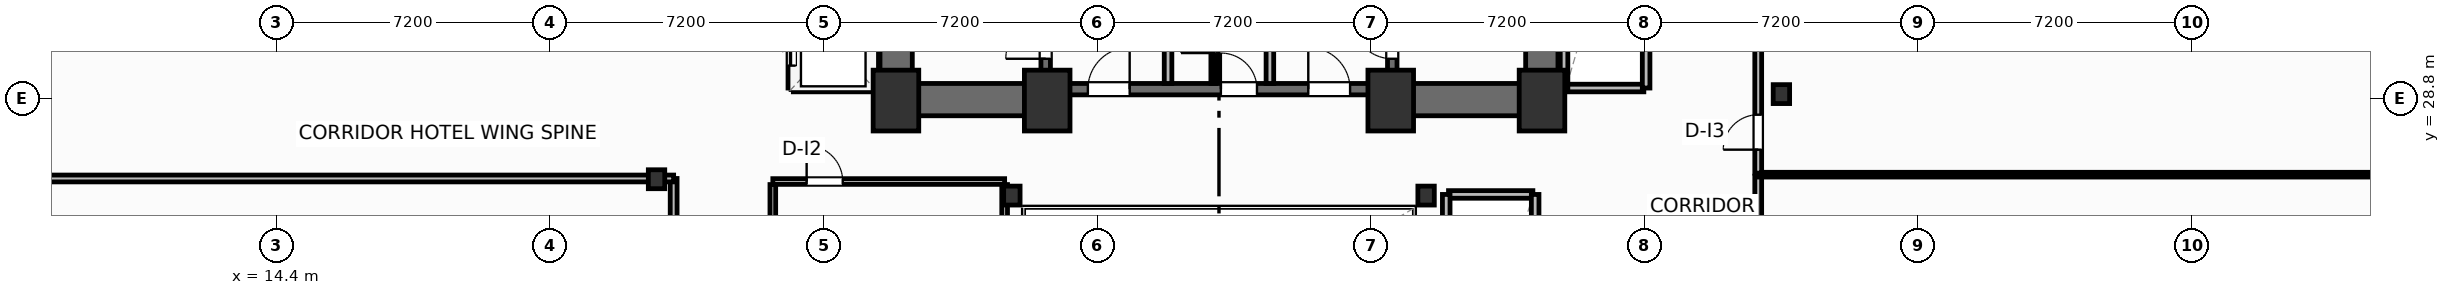
"""IFC4 building model, lengths in metres.
Left out: names, types, materials, properties, quantities, classifications, styles, units other than length and angle.
Written with IfcOpenShell. Run it as: python <this file> out.ifc"""

import sys

from ifc_helpers import new_model, si_unit, direction, frame, frame_2d, origin, origin_2d, place, context, subcontext, project, spatial, rectangle, i_section, extrude, element, fill, save


model = new_model("IFC4")
c1 = context("Model", 3, precision=1e-05, world=origin(), true_north=direction((0.0, 1.0)))
c2 = subcontext(c1, "Body", "Model", "MODEL_VIEW")
j1 = project(units=[si_unit("LENGTHUNIT", "METRE"), si_unit("PLANEANGLEUNIT", "RADIAN")], contexts=[c1])
p1 = place(None, origin())
s1 = spatial("IfcSite", under=j1, at=p1, CompositionType="ELEMENT")
p2 = place(p1, origin())
s2 = spatial("IfcBuilding", under=s1, at=p2, CompositionType="ELEMENT")
p3 = place(p2, frame((0.0, 0.0, 60.3)))
s3 = spatial("IfcBuildingStorey", under=s2, at=p3, CompositionType="ELEMENT", Elevation=60.3)
for number, where, z_axis, x_axis in (
    (1, (30.7, 28.75, 0.0), (0.0, 0.0, 1.0), (1.0, 0.0, 0.0)),
    (2, (34.68, 28.75, 0.0), (0.0, 0.0, 1.0), (1.0, 0.0, 0.0)),
    (3, (43.72, 28.75, 0.0), (0.0, 0.0, 1.0), (1.0, 0.0, 0.0)),
    (4, (47.7, 28.75, 0.0), (0.0, 0.0, 1.0), (1.0, 0.0, 0.0)),
):
    element("IfcColumn", number, at=place(p3, frame(where, z_axis=z_axis, x_axis=x_axis)), inside=s3, PredefinedType="COLUMN", context=c2, shape_type="SweptSolid", body=[
        extrude(rectangle(XDim=1.2, YDim=1.6, at=origin_2d()), origin(), (0.0, 0.0, 1.0), 3.7),
    ])
for number, where, z_axis, x_axis in (
    (5, (33.75, 26.25, 0.0), (0.0, 0.0, 1.0), (1.0, 0.0, 0.0)),
    (6, (44.65, 26.25, 0.0), (0.0, 0.0, 1.0), (1.0, 0.0, 0.0)),
    (7, (24.4, 26.68, 0.0), (0.0, 0.0, 1.0), (1.0, 0.0, 0.0)),
    (8, (54.0, 28.92, 0.0), (0.0, 0.0, 1.0), (1.0, 0.0, 0.0)),
):
    element("IfcColumn", number, at=place(p3, frame(where, z_axis=z_axis, x_axis=x_axis)), inside=s3, PredefinedType="COLUMN", context=c2, shape_type="SweptSolid", body=[
        extrude(i_section(OverallWidth=0.432, OverallDepth=0.498, WebThickness=0.056, FlangeThickness=0.089, FilletRadius=0.025, at=origin_2d()), origin(), (0.0, 0.0, 1.0), 3.7),
    ])
for number, where, z_axis, x_axis in (
    (9, (30.705, 29.2, 0.0), (0.0, 0.0, 1.0), (0.0, 1.0, 0.0)),
    (10, (47.695, 29.2, 0.0), (0.0, 0.0, 1.0), (0.0, 1.0, 0.0)),
):
    element("IfcWall", number, at=place(p3, frame(where, z_axis=z_axis, x_axis=x_axis)), inside=s3, PredefinedType="SHEAR", context=c2, shape_type="SweptSolid", body=[
        extrude(rectangle(XDim=9.22, YDim=0.85, at=frame_2d((4.61, 0.0))), origin(), (0.0, 0.0, 1.0), 3.45),
    ])
for number, where, z_axis, x_axis in (
    (11, (30.28, 28.775, 0.0), (0.0, 0.0, 1.0), (1.0, 0.0, 0.0)),
    (12, (43.6, 28.775, 0.0), (0.0, 0.0, 1.0), (1.0, 0.0, 0.0)),
):
    element("IfcWall", number, at=place(p3, frame(where, z_axis=z_axis, x_axis=x_axis)), inside=s3, PredefinedType="SHEAR", context=c2, shape_type="SweptSolid", body=[
        extrude(rectangle(XDim=4.52, YDim=0.85, at=frame_2d((2.26, 0.0))), origin(), (0.0, 0.0, 1.0), 3.45),
    ])
p4 = place(p3, frame((34.8, 29.05, 0.0), z_axis=(0.0, 0.0, 1.0), x_axis=(1.0, 0.0, 0.0)))
e13 = element("IfcWall", 13, at=p4, inside=s3, PredefinedType="SHEAR", context=c2, shape_type="SweptSolid", body=[
    extrude(rectangle(XDim=8.8, YDim=0.3, at=frame_2d((4.4, 0.0))), origin(), (0.0, 0.0, 1.0), 3.45),
])
p5 = place(p4, frame((0.95, 0.0, 0.0)))
e14 = element("IfcOpeningElement", 14, at=p5, cuts=e13, PredefinedType="OPENING", context=c2, shape_type="SweptSolid", body=[
    extrude(rectangle(XDim=1.1, YDim=2.15, at=frame_2d((0.55, 1.075))), frame((0.0, 0.16, 0.0), z_axis=(0.0, -1.0, 0.0), x_axis=(1.0, 0.0, 0.0)), (0.0, 0.0, 1.0), 0.32),
])
p6 = place(p4, frame((6.75, 0.0, 0.0)))
e15 = element("IfcOpeningElement", 15, at=p6, cuts=e13, PredefinedType="OPENING", context=c2, shape_type="SweptSolid", body=[
    extrude(rectangle(XDim=1.1, YDim=2.15, at=frame_2d((0.55, 1.075))), frame((0.0, 0.16, 0.0), z_axis=(0.0, -1.0, 0.0), x_axis=(1.0, 0.0, 0.0)), (0.0, 0.0, 1.0), 0.32),
])
p7 = place(p4, frame((4.45, 0.0, 0.0)))
e16 = element("IfcOpeningElement", 16, at=p7, cuts=e13, PredefinedType="OPENING", context=c2, shape_type="SweptSolid", body=[
    extrude(rectangle(XDim=0.95, YDim=2.15, at=frame_2d((0.475, 1.075))), frame((0.0, 0.16, 0.0), z_axis=(0.0, -1.0, 0.0), x_axis=(1.0, 0.0, 0.0)), (0.0, 0.0, 1.0), 0.32),
])
p8 = place(p3, frame((34.64, 29.2, 0.0), z_axis=(0.0, 0.0, 1.0), x_axis=(0.0, 1.0, 0.0)))
e17 = element("IfcWall", 17, at=p8, inside=s3, PredefinedType="SHEAR", context=c2, shape_type="SweptSolid", body=[
    extrude(rectangle(XDim=9.22, YDim=0.25, at=frame_2d((4.61, 0.0))), origin(), (0.0, 0.0, 1.0), 3.45),
])
p9 = place(p8, frame((0.65, 0.0, 0.0)))
e18 = element("IfcOpeningElement", 18, at=p9, cuts=e17, PredefinedType="OPENING", context=c2, shape_type="SweptSolid", body=[
    extrude(rectangle(XDim=1.05, YDim=2.15, at=frame_2d((0.525, 1.075))), frame((0.0, 0.135, 0.0), z_axis=(0.0, -1.0, 0.0), x_axis=(1.0, 0.0, 0.0)), (0.0, 0.0, 1.0), 0.27),
])
p10 = place(p3, frame((43.76, 29.2, 0.0), z_axis=(0.0, 0.0, 1.0), x_axis=(0.0, 1.0, 0.0)))
e19 = element("IfcWall", 19, at=p10, inside=s3, PredefinedType="SHEAR", context=c2, shape_type="SweptSolid", body=[
    extrude(rectangle(XDim=9.22, YDim=0.25, at=frame_2d((4.61, 0.0))), origin(), (0.0, 0.0, 1.0), 3.45),
])
p11 = place(p10, frame((0.65, 0.0, 0.0)))
e20 = element("IfcOpeningElement", 20, at=p11, cuts=e19, PredefinedType="OPENING", context=c2, shape_type="SweptSolid", body=[
    extrude(rectangle(XDim=1.05, YDim=2.15, at=frame_2d((0.525, 1.075))), frame((0.0, 0.135, 0.0), z_axis=(0.0, -1.0, 0.0), x_axis=(1.0, 0.0, 0.0)), (0.0, 0.0, 1.0), 0.27),
])
p12 = place(p3, frame((81.127, 26.995, 0.0), z_axis=(0.0, 0.0, 1.0), x_axis=(-0.823530169317, 0.567272474411, 0.0)))
e21 = element("IfcWall", 21, at=p12, inside=s3, PredefinedType="SOLIDWALL", context=c2, shape_type="SweptSolid", body=[
    extrude(rectangle(XDim=23.247, YDim=0.22, at=frame_2d((11.624, 0.0))), origin(), (0.0, 0.0, 1.0), 2.73),
])
p13 = place(p12, frame((10.799, 0.0, 0.8)))
e22 = element("IfcOpeningElement", 22, at=p13, cuts=e21, PredefinedType="OPENING", context=c2, shape_type="SweptSolid", body=[
    extrude(rectangle(XDim=1.65, YDim=1.65, at=frame_2d((0.825, 0.825))), frame((0.0, 0.12, 0.0), z_axis=(0.0, -1.0, 0.0), x_axis=(1.0, 0.0, 0.0)), (0.0, 0.0, 1.0), 0.24),
])
p14 = place(p3, frame((24.85, 19.24, 0.0), z_axis=(0.0, 0.0, 1.0), x_axis=(0.0, 1.0, 0.0)))
e23 = element("IfcWall", 23, at=p14, inside=s3, PredefinedType="PARTITIONING", context=c2, shape_type="SweptSolid", body=[
    extrude(rectangle(XDim=7.46, YDim=0.18, at=frame_2d((3.73, 0.0))), origin(), (0.0, 0.0, 1.0), 3.45),
])
p15 = place(p14, frame((3.235, 0.0, 0.0)))
e24 = element("IfcOpeningElement", 24, at=p15, cuts=e23, PredefinedType="OPENING", context=c2, shape_type="SweptSolid", body=[
    extrude(rectangle(XDim=0.95, YDim=2.05, at=frame_2d((0.475, 1.025))), frame((0.0, 0.1, 0.0), z_axis=(0.0, -1.0, 0.0), x_axis=(1.0, 0.0, 0.0)), (0.0, 0.0, 1.0), 0.2),
])
p16 = place(p3, frame((0.2, 26.7, 0.0), z_axis=(0.0, 0.0, 1.0), x_axis=(1.0, 0.0, 0.0)))
e25 = element("IfcWall", 25, at=p16, inside=s3, PredefinedType="PARTITIONING", context=c2, shape_type="SweptSolid", body=[
    extrude(rectangle(XDim=24.65, YDim=0.18, at=frame_2d((12.325, 0.0))), origin(), (0.0, 0.0, 1.0), 2.662),
])
p17 = place(p3, frame((53.39, 19.24, 0.0), z_axis=(0.0, 0.0, 1.0), x_axis=(0.0, 1.0, 0.0)))
e26 = element("IfcWall", 26, at=p17, inside=s3, PredefinedType="PARTITIONING", context=c2, shape_type="SweptSolid", body=[
    extrude(rectangle(XDim=7.52, YDim=0.18, at=frame_2d((3.76, 0.0))), origin(), (0.0, 0.0, 1.0), 3.45),
])
p18 = place(p17, frame((2.1, 0.0, 0.0)))
e27 = element("IfcOpeningElement", 27, at=p18, cuts=e26, PredefinedType="OPENING", context=c2, shape_type="SweptSolid", body=[
    extrude(rectangle(XDim=0.92, YDim=2.05, at=frame_2d((0.46, 1.025))), frame((0.0, 0.1, 0.0), z_axis=(0.0, -1.0, 0.0), x_axis=(1.0, 0.0, 0.0)), (0.0, 0.0, 1.0), 0.2),
])
p19 = place(p3, frame((53.39, 26.8, 0.0), z_axis=(0.0, 0.0, 1.0), x_axis=(1.0, 0.0, 0.0)))
e28 = element("IfcWall", 28, at=p19, inside=s3, PredefinedType="PARTITIONING", context=c2, shape_type="SweptSolid", body=[
    extrude(rectangle(XDim=23.61, YDim=0.125, at=frame_2d((11.805, 0.0))), origin(), (0.0, 0.0, 1.0), 3.45),
])
p20 = place(p3, frame((53.39, 26.84, 0.0), z_axis=(0.0, 0.0, 1.0), x_axis=(0.0, 1.0, 0.0)))
e29 = element("IfcWall", 29, at=p20, inside=s3, PredefinedType="PARTITIONING", context=c2, shape_type="SweptSolid", body=[
    extrude(rectangle(XDim=12.46, YDim=0.18, at=frame_2d((6.23, 0.0))), origin(), (0.0, 0.0, 1.0), 3.45),
])
p21 = place(p20, frame((0.618, 0.0, 0.0)))
e30 = element("IfcOpeningElement", 30, at=p21, cuts=e29, PredefinedType="OPENING", context=c2, shape_type="SweptSolid", body=[
    extrude(rectangle(XDim=0.92, YDim=2.05, at=frame_2d((0.46, 1.025))), frame((0.0, 0.1, 0.0), z_axis=(0.0, -1.0, 0.0), x_axis=(1.0, 0.0, 0.0)), (0.0, 0.0, 1.0), 0.2),
])
for number, where, z_axis, x_axis in (
    (31, (37.86, 29.2, 0.0), (0.0, 0.0, 1.0), (0.0, 1.0, 0.0)),
    (32, (40.54, 29.2, 0.0), (0.0, 0.0, 1.0), (0.0, 1.0, 0.0)),
):
    element("IfcWall", number, at=place(p3, frame(where, z_axis=z_axis, x_axis=x_axis)), inside=s3, PredefinedType="PARTITIONING", context=c2, shape_type="SweptSolid", body=[
        extrude(rectangle(XDim=5.18, YDim=0.2, at=frame_2d((2.59, 0.0))), origin(), (0.0, 0.0, 1.0), 3.45),
    ])
p22 = place(p3, frame((39.05, 29.2, 0.0), z_axis=(0.0, 0.0, 1.0), x_axis=(0.0, 1.0, 0.0)))
e33 = element("IfcWall", 33, at=p22, inside=s3, PredefinedType="PARTITIONING", context=c2, shape_type="SweptSolid", body=[
    extrude(rectangle(XDim=5.22, YDim=0.125, at=frame_2d((2.61, 0.0))), origin(), (0.0, 0.0, 1.0), 3.45),
])
p23 = place(p22, frame((0.8, 0.0, 0.0)))
e34 = element("IfcOpeningElement", 34, at=p23, cuts=e33, PredefinedType="OPENING", context=c2, shape_type="SweptSolid", body=[
    extrude(rectangle(XDim=0.85, YDim=2.05, at=frame_2d((0.425, 1.025))), frame((0.0, 0.073, 0.0), z_axis=(0.0, -1.0, 0.0), x_axis=(1.0, 0.0, 0.0)), (0.0, 0.0, 1.0), 0.145),
])
p24 = place(p22, frame((3.4, 0.0, 0.0)))
e35 = element("IfcOpeningElement", 35, at=p24, cuts=e33, PredefinedType="OPENING", context=c2, shape_type="SweptSolid", body=[
    extrude(rectangle(XDim=0.85, YDim=2.05, at=frame_2d((0.425, 1.025))), frame((0.0, 0.073, 0.0), z_axis=(0.0, -1.0, 0.0), x_axis=(1.0, 0.0, 0.0)), (0.0, 0.0, 1.0), 0.145),
])
p25 = place(p3, frame((27.46, 26.62, 0.0), z_axis=(0.0, 0.0, 1.0), x_axis=(1.0, 0.0, 0.0)))
e36 = element("IfcWall", 36, at=p25, inside=s3, PredefinedType="PARTITIONING", context=c2, shape_type="SweptSolid", body=[
    extrude(rectangle(XDim=6.1, YDim=0.15, at=frame_2d((3.05, 0.0))), origin(), (0.0, 0.0, 1.0), 2.662),
])
p26 = place(p25, frame((0.89, 0.0, 0.0)))
e37 = element("IfcOpeningElement", 37, at=p26, cuts=e36, PredefinedType="OPENING", context=c2, shape_type="SweptSolid", body=[
    extrude(rectangle(XDim=0.95, YDim=2.05, at=frame_2d((0.475, 1.025))), frame((0.0, 0.085, 0.0), z_axis=(0.0, -1.0, 0.0), x_axis=(1.0, 0.0, 0.0)), (0.0, 0.0, 1.0), 0.17),
])
p27 = place(p3, frame((27.46, 19.38, 0.0), z_axis=(0.0, 0.0, 1.0), x_axis=(0.0, 1.0, 0.0)))
e38 = element("IfcWall", 38, at=p27, inside=s3, PredefinedType="PARTITIONING", context=c2, shape_type="SweptSolid", body=[
    extrude(rectangle(XDim=7.16, YDim=0.15, at=frame_2d((3.58, 0.0))), origin(), (0.0, 0.0, 1.0), 3.45),
])
p28 = place(p27, frame((1.1, 0.0, 0.0)))
e39 = element("IfcOpeningElement", 39, at=p28, cuts=e38, PredefinedType="OPENING", context=c2, shape_type="SweptSolid", body=[
    extrude(rectangle(XDim=0.9, YDim=2.05, at=frame_2d((0.45, 1.025))), frame((0.0, 0.085, 0.0), z_axis=(0.0, -1.0, 0.0), x_axis=(1.0, 0.0, 0.0)), (0.0, 0.0, 1.0), 0.17),
])
p29 = place(p3, frame((33.56, 19.38, 0.0), z_axis=(0.0, 0.0, 1.0), x_axis=(0.0, 1.0, 0.0)))
e40 = element("IfcWall", 40, at=p29, inside=s3, PredefinedType="PARTITIONING", context=c2, shape_type="SweptSolid", body=[
    extrude(rectangle(XDim=7.16, YDim=0.15, at=frame_2d((3.58, 0.0))), origin(), (0.0, 0.0, 1.0), 2.824),
])
p30 = place(p3, frame((28.0, 29.08, 0.0), z_axis=(0.0, 0.0, 1.0), x_axis=(1.0, 0.0, 0.0)))
e41 = element("IfcWall", 41, at=p30, inside=s3, PredefinedType="PARTITIONING", context=c2, shape_type="SweptSolid", body=[
    extrude(rectangle(XDim=2.1, YDim=0.2, at=frame_2d((1.05, 0.0))), origin(), (0.0, 0.0, 1.0), 3.45),
])
p31 = place(p3, frame((30.12, 29.08, 0.0), z_axis=(0.0, 0.0, 1.0), x_axis=(0.0, 1.0, 0.0)))
e42 = element("IfcWall", 42, at=p31, inside=s3, PredefinedType="PARTITIONING", context=c2, shape_type="SweptSolid", body=[
    extrude(rectangle(XDim=6.89, YDim=0.2, at=frame_2d((3.445, 0.0))), origin(), (0.0, 0.0, 1.0), 3.45),
])
p32 = place(p3, frame((27.96, 29.08, 0.0), z_axis=(0.0, 0.0, 1.0), x_axis=(0.0, 1.0, 0.0)))
e43 = element("IfcWall", 43, at=p32, inside=s3, PredefinedType="PARTITIONING", context=c2, shape_type="SweptSolid", body=[
    extrude(rectangle(XDim=6.89, YDim=0.2, at=frame_2d((3.445, 0.0))), origin(), (0.0, 0.0, 1.0), 3.45),
])
p33 = place(p32, frame((0.59, 0.0, 0.0)))
e44 = element("IfcOpeningElement", 44, at=p33, cuts=e43, PredefinedType="OPENING", context=c2, shape_type="SweptSolid", body=[
    extrude(rectangle(XDim=1.1, YDim=2.15, at=frame_2d((0.55, 1.075))), frame((0.0, 0.11, 0.0), z_axis=(0.0, -1.0, 0.0), x_axis=(1.0, 0.0, 0.0)), (0.0, 0.0, 1.0), 0.22),
])
p34 = place(p32, frame((2.89, 0.0, 0.0)))
e45 = element("IfcOpeningElement", 45, at=p34, cuts=e43, PredefinedType="OPENING", context=c2, shape_type="SweptSolid", body=[
    extrude(rectangle(XDim=1.1, YDim=2.15, at=frame_2d((0.55, 1.075))), frame((0.0, 0.11, 0.0), z_axis=(0.0, -1.0, 0.0), x_axis=(1.0, 0.0, 0.0)), (0.0, 0.0, 1.0), 0.22),
])
p35 = place(p32, frame((5.19, 0.0, 0.0)))
e46 = element("IfcOpeningElement", 46, at=p35, cuts=e43, PredefinedType="OPENING", context=c2, shape_type="SweptSolid", body=[
    extrude(rectangle(XDim=1.1, YDim=2.15, at=frame_2d((0.55, 1.075))), frame((0.0, 0.11, 0.0), z_axis=(0.0, -1.0, 0.0), x_axis=(1.0, 0.0, 0.0)), (0.0, 0.0, 1.0), 0.22),
])
p36 = place(p3, frame((48.32, 29.08, 0.0), z_axis=(0.0, 0.0, 1.0), x_axis=(1.0, 0.0, 0.0)))
e47 = element("IfcWall", 47, at=p36, inside=s3, PredefinedType="PARTITIONING", context=c2, shape_type="SweptSolid", body=[
    extrude(rectangle(XDim=2.06, YDim=0.2, at=frame_2d((1.03, 0.0))), origin(), (0.0, 0.0, 1.0), 2.662),
])
for number, where, z_axis, x_axis in (
    (48, (48.28, 29.08, 0.0), (0.0, 0.0, 1.0), (0.0, 1.0, 0.0)),
    (49, (50.44, 29.08, 0.0), (0.0, 0.0, 1.0), (0.0, 1.0, 0.0)),
):
    element("IfcWall", number, at=place(p3, frame(where, z_axis=z_axis, x_axis=x_axis)), inside=s3, PredefinedType="PARTITIONING", context=c2, shape_type="SweptSolid", body=[
        extrude(rectangle(XDim=6.89, YDim=0.2, at=frame_2d((3.445, 0.0))), origin(), (0.0, 0.0, 1.0), 3.45),
    ])
p37 = place(p3, frame((45.24, 26.28, 0.0), z_axis=(0.0, 0.0, 1.0), x_axis=(1.0, 0.0, 0.0)))
e50 = element("IfcWall", 50, at=p37, inside=s3, PredefinedType="PARTITIONING", context=c2, shape_type="SweptSolid", body=[
    extrude(rectangle(XDim=2.22, YDim=0.2, at=frame_2d((1.11, 0.0))), origin(), (0.0, 0.0, 1.0), 3.45),
])
for number, where, z_axis, x_axis in (
    (51, (45.18, 19.38, 0.0), (0.0, 0.0, 1.0), (0.0, 1.0, 0.0)),
    (52, (47.52, 19.38, 0.0), (0.0, 0.0, 1.0), (0.0, 1.0, 0.0)),
):
    element("IfcWall", number, at=place(p3, frame(where, z_axis=z_axis, x_axis=x_axis)), inside=s3, PredefinedType="PARTITIONING", context=c2, shape_type="SweptSolid", body=[
        extrude(rectangle(XDim=6.9, YDim=0.2, at=frame_2d((3.45, 0.0))), origin(), (0.0, 0.0, 1.0), 3.45),
    ])
p38 = place(p21, origin())
e53 = element("IfcDoor", 53, at=p38, inside=s3, OperationType="SINGLE_SWING_LEFT", PredefinedType="DOOR", context=c2, shape_type="SweptSolid", body=[
    extrude(rectangle(XDim=0.92, YDim=2.05, at=frame_2d((0.46, 1.025))), frame((0.0, 0.025, 0.0), z_axis=(0.0, -1.0, 0.0), x_axis=(1.0, 0.0, 0.0)), (0.0, 0.0, 1.0), 0.05),
])
fill(e30, e53)
p39 = place(p9, origin())
e54 = element("IfcDoor", 54, at=p39, inside=s3, OperationType="SINGLE_SWING_LEFT", PredefinedType="DOOR", context=c2, shape_type="SweptSolid", body=[
    extrude(rectangle(XDim=1.05, YDim=2.15, at=frame_2d((0.525, 1.075))), frame((0.0, 0.025, 0.0), z_axis=(0.0, -1.0, 0.0), x_axis=(1.0, 0.0, 0.0)), (0.0, 0.0, 1.0), 0.05),
])
fill(e18, e54)
p40 = place(p11, origin())
e55 = element("IfcDoor", 55, at=p40, inside=s3, OperationType="SINGLE_SWING_RIGHT", PredefinedType="DOOR", context=c2, shape_type="SweptSolid", body=[
    extrude(rectangle(XDim=1.05, YDim=2.15, at=frame_2d((0.525, 1.075))), frame((0.0, 0.025, 0.0), z_axis=(0.0, -1.0, 0.0), x_axis=(1.0, 0.0, 0.0)), (0.0, 0.0, 1.0), 0.05),
])
fill(e20, e55)
p41 = place(p5, origin())
e56 = element("IfcDoor", 56, at=p41, inside=s3, OperationType="SINGLE_SWING_RIGHT", PredefinedType="DOOR", context=c2, shape_type="SweptSolid", body=[
    extrude(rectangle(XDim=1.1, YDim=2.15, at=frame_2d((0.55, 1.075))), frame((0.0, 0.025, 0.0), z_axis=(0.0, -1.0, 0.0), x_axis=(1.0, 0.0, 0.0)), (0.0, 0.0, 1.0), 0.05),
])
fill(e14, e56)
p42 = place(p6, origin())
e57 = element("IfcDoor", 57, at=p42, inside=s3, OperationType="SINGLE_SWING_LEFT", PredefinedType="DOOR", context=c2, shape_type="SweptSolid", body=[
    extrude(rectangle(XDim=1.1, YDim=2.15, at=frame_2d((0.55, 1.075))), frame((0.0, 0.025, 0.0), z_axis=(0.0, -1.0, 0.0), x_axis=(1.0, 0.0, 0.0)), (0.0, 0.0, 1.0), 0.05),
])
fill(e15, e57)
p43 = place(p23, origin())
e58 = element("IfcDoor", 58, at=p43, inside=s3, OperationType="SINGLE_SWING_LEFT", PredefinedType="DOOR", context=c2, shape_type="SweptSolid", body=[
    extrude(rectangle(XDim=0.85, YDim=2.05, at=frame_2d((0.425, 1.025))), frame((0.0, 0.025, 0.0), z_axis=(0.0, -1.0, 0.0), x_axis=(1.0, 0.0, 0.0)), (0.0, 0.0, 1.0), 0.05),
])
fill(e34, e58)
p44 = place(p7, origin())
e59 = element("IfcDoor", 59, at=p44, inside=s3, OperationType="SINGLE_SWING_LEFT", PredefinedType="DOOR", context=c2, shape_type="SweptSolid", body=[
    extrude(rectangle(XDim=0.95, YDim=2.15, at=frame_2d((0.475, 1.075))), frame((0.0, 0.025, 0.0), z_axis=(0.0, -1.0, 0.0), x_axis=(1.0, 0.0, 0.0)), (0.0, 0.0, 1.0), 0.05),
])
fill(e16, e59)
p45 = place(p26, origin())
e60 = element("IfcDoor", 60, at=p45, inside=s3, OperationType="SINGLE_SWING_LEFT", PredefinedType="DOOR", context=c2, shape_type="SweptSolid", body=[
    extrude(rectangle(XDim=0.95, YDim=2.05, at=frame_2d((0.475, 1.025))), frame((0.0, 0.025, 0.0), z_axis=(0.0, -1.0, 0.0), x_axis=(1.0, 0.0, 0.0)), (0.0, 0.0, 1.0), 0.05),
])
fill(e37, e60)
p46 = place(p33, origin())
e61 = element("IfcDoor", 61, at=p46, inside=s3, OperationType="SLIDING_TO_LEFT", PredefinedType="DOOR", context=c2, shape_type="SweptSolid", body=[
    extrude(rectangle(XDim=1.1, YDim=2.15, at=frame_2d((0.55, 1.075))), frame((0.0, 0.025, 0.0), z_axis=(0.0, -1.0, 0.0), x_axis=(1.0, 0.0, 0.0)), (0.0, 0.0, 1.0), 0.05),
])
fill(e44, e61)
save(model, sys.argv[1])
